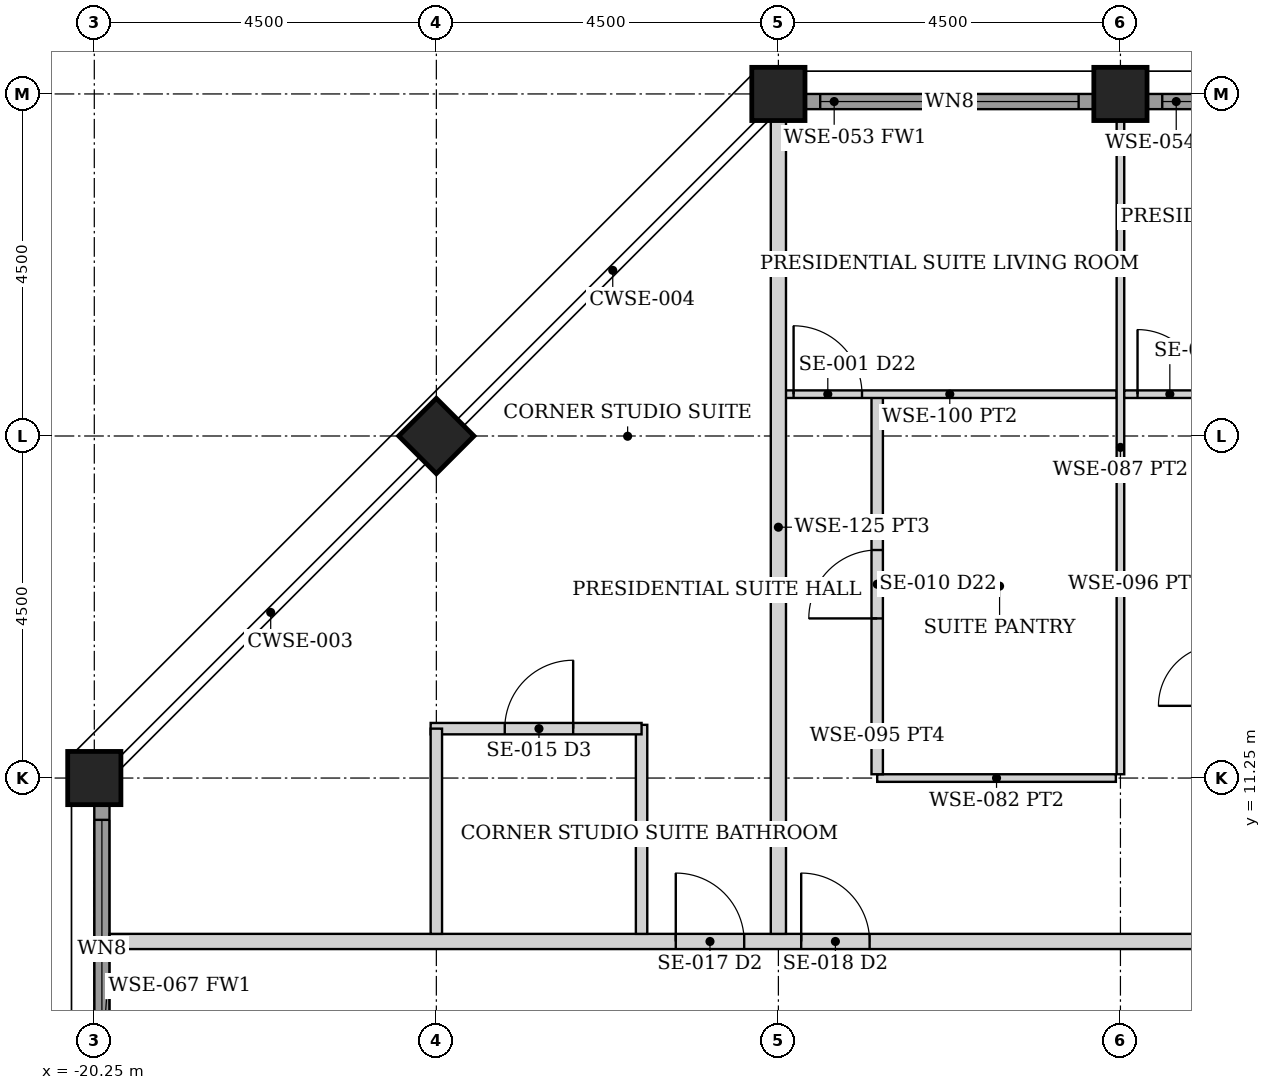
"""IFC4 building model, lengths in metres.
Left out: names, types, materials, properties, quantities, classifications, styles, units other than length and angle.
Written with IfcOpenShell. Run it as: python <this file> out.ifc"""

import sys

from ifc_helpers import new_model, si_unit, direction, frame, frame_2d, origin, origin_2d, place, context, subcontext, project, spatial, rectangle, hollow_rectangle, extrude, element, fill, save


model = new_model("IFC4")
c1 = context("Model", 3, precision=1e-05, world=origin(), true_north=direction((0.0, 1.0)))
c2 = subcontext(c1, "Body", "Model", "MODEL_VIEW")
j1 = project(units=[si_unit("LENGTHUNIT", "METRE"), si_unit("PLANEANGLEUNIT", "RADIAN")], contexts=[c1])
p1 = place(None, origin())
s1 = spatial("IfcSite", under=j1, at=p1, CompositionType="ELEMENT")
p2 = place(p1, origin())
s2 = spatial("IfcBuilding", under=s1, at=p2, CompositionType="ELEMENT")
p3 = place(p2, frame((0.0, 0.0, 253.3)))
s3 = spatial("IfcBuildingStorey", under=s2, at=p3, CompositionType="ELEMENT", Elevation=253.3)
for number, where, z_axis, x_axis in (
    (1, (-11.25, 20.25, 0.0), (0.0, 0.0, 1.0), (0.0, 1.0, 0.0)),
    (2, (-6.75, 20.25, 0.0), (0.0, 0.0, 1.0), (0.0, 1.0, 0.0)),
    (3, (-20.25, 11.25, 0.0), (0.0, 0.0, 1.0), (1.0, 0.0, 0.0)),
    (4, (-15.75, 15.75, 0.0), (0.0, 0.0, 1.0), (0.707, -0.707, 0.0)),
):
    element("IfcColumn", number, at=place(p3, frame(where, z_axis=z_axis, x_axis=x_axis)), inside=s3, PredefinedType="COLUMN", context=c2, shape_type="SweptSolid", body=[
        extrude(hollow_rectangle(XDim=0.7, YDim=0.7, WallThickness=0.035, at=origin_2d()), origin(), (0.0, 0.0, 1.0), 3.75),
    ])
p4 = place(p3, frame((-10.895, 20.15, 0.0), z_axis=(0.0, 0.0, 1.0), x_axis=(1.0, 0.0, 0.0)))
e5 = element("IfcWall", 5, at=p4, inside=s3, PredefinedType="SOLIDWALL", context=c2, shape_type="SweptSolid", body=[
    extrude(rectangle(XDim=3.79, YDim=0.2, at=frame_2d((1.895, 0.0))), origin(), (0.0, 0.0, 1.0), 2.579),
])
p5 = place(p4, frame((0.195, 0.0, 0.3)))
e6 = element("IfcOpeningElement", 6, at=p5, cuts=e5, PredefinedType="OPENING", context=c2, shape_type="SweptSolid", body=[
    extrude(rectangle(XDim=3.4, YDim=2.129, at=frame_2d((1.7, 1.064))), frame((0.0, 0.11, 0.0), z_axis=(0.0, -1.0, 0.0), x_axis=(1.0, 0.0, 0.0)), (0.0, 0.0, 1.0), 0.22),
])
p6 = place(p3, frame((-6.395, 20.15, 0.0), z_axis=(0.0, 0.0, 1.0), x_axis=(1.0, 0.0, 0.0)))
e7 = element("IfcWall", 7, at=p6, inside=s3, PredefinedType="SOLIDWALL", context=c2, shape_type="SweptSolid", body=[
    extrude(rectangle(XDim=3.79, YDim=0.2, at=frame_2d((1.895, 0.0))), origin(), (0.0, 0.0, 1.0), 2.579),
])
p7 = place(p6, frame((0.195, 0.0, 0.3)))
e8 = element("IfcOpeningElement", 8, at=p7, cuts=e7, PredefinedType="OPENING", context=c2, shape_type="SweptSolid", body=[
    extrude(rectangle(XDim=3.4, YDim=2.129, at=frame_2d((1.7, 1.064))), frame((0.0, 0.11, 0.0), z_axis=(0.0, -1.0, 0.0), x_axis=(1.0, 0.0, 0.0)), (0.0, 0.0, 1.0), 0.22),
])
p8 = place(p3, frame((-20.15, 7.105, 0.0), z_axis=(0.0, 0.0, 1.0), x_axis=(0.0, 1.0, 0.0)))
e9 = element("IfcWall", 9, at=p8, inside=s3, PredefinedType="SOLIDWALL", context=c2, shape_type="SweptSolid", body=[
    extrude(rectangle(XDim=3.79, YDim=0.2, at=frame_2d((1.895, 0.0))), origin(), (0.0, 0.0, 1.0), 2.579),
])
p9 = place(p8, frame((0.195, 0.0, 0.3)))
e10 = element("IfcOpeningElement", 10, at=p9, cuts=e9, PredefinedType="OPENING", context=c2, shape_type="SweptSolid", body=[
    extrude(rectangle(XDim=3.4, YDim=2.129, at=frame_2d((1.7, 1.064))), frame((0.0, 0.11, 0.0), z_axis=(0.0, -1.0, 0.0), x_axis=(1.0, 0.0, 0.0)), (0.0, 0.0, 1.0), 0.22),
])
p10 = place(p3, frame((-20.05, 9.1, 0.0), z_axis=(0.0, 0.0, 1.0), x_axis=(1.0, 0.0, 0.0)))
e11 = element("IfcWall", 11, at=p10, inside=s3, PredefinedType="PARTITIONING", context=c2, shape_type="SweptSolid", body=[
    extrude(rectangle(XDim=40.1, YDim=0.2, at=frame_2d((20.05, 0.0))), origin(), (0.0, 0.0, 1.0), 2.573),
])
p11 = place(p10, frame((9.1, 0.0, 0.0)))
e12 = element("IfcOpeningElement", 12, at=p11, cuts=e11, PredefinedType="OPENING", context=c2, shape_type="SweptSolid", body=[
    extrude(rectangle(XDim=0.9, YDim=2.1, at=frame_2d((0.45, 1.05))), frame((0.0, 0.11, 0.0), z_axis=(0.0, -1.0, 0.0), x_axis=(1.0, 0.0, 0.0)), (0.0, 0.0, 1.0), 0.22),
])
p12 = place(p10, frame((31.75, 0.0, 0.0)))
e13 = element("IfcOpeningElement", 13, at=p12, cuts=e11, PredefinedType="OPENING", context=c2, shape_type="SweptSolid", body=[
    extrude(rectangle(XDim=0.9, YDim=2.1, at=frame_2d((0.45, 1.05))), frame((0.0, 0.11, 0.0), z_axis=(0.0, -1.0, 0.0), x_axis=(1.0, 0.0, 0.0)), (0.0, 0.0, 1.0), 0.22),
])
p13 = place(p10, frame((7.45, 0.0, 0.0)))
e14 = element("IfcOpeningElement", 14, at=p13, cuts=e11, PredefinedType="OPENING", context=c2, shape_type="SweptSolid", body=[
    extrude(rectangle(XDim=0.9, YDim=2.1, at=frame_2d((0.45, 1.05))), frame((0.0, 0.11, 0.0), z_axis=(0.0, -1.0, 0.0), x_axis=(1.0, 0.0, 0.0)), (0.0, 0.0, 1.0), 0.22),
])
p14 = place(p3, frame((-9.95, 11.25, 0.0), z_axis=(0.0, 0.0, 1.0), x_axis=(1.0, 0.0, 0.0)))
e15 = element("IfcWall", 15, at=p14, inside=s3, PredefinedType="PARTITIONING", context=c2, shape_type="SweptSolid", body=[
    extrude(rectangle(XDim=3.14, YDim=0.1, at=frame_2d((1.57, 0.0))), origin(), (0.0, 0.0, 1.0), 2.573),
])
p15 = place(p3, frame((-9.95, 11.3, 0.0), z_axis=(0.0, 0.0, 1.0), x_axis=(0.0, 1.0, 0.0)))
e16 = element("IfcWall", 16, at=p15, inside=s3, PredefinedType="PARTITIONING", context=c2, shape_type="SweptSolid", body=[
    extrude(rectangle(XDim=5.0, YDim=0.15, at=frame_2d((2.5, 0.0))), origin(), (0.0, 0.0, 1.0), 2.573),
])
p16 = place(p15, frame((2.05, 0.0, 0.0)))
e17 = element("IfcOpeningElement", 17, at=p16, cuts=e16, PredefinedType="OPENING", context=c2, shape_type="SweptSolid", body=[
    extrude(rectangle(XDim=0.9, YDim=2.1, at=frame_2d((0.45, 1.05))), frame((0.0, 0.085, 0.0), z_axis=(0.0, -1.0, 0.0), x_axis=(1.0, 0.0, 0.0)), (0.0, 0.0, 1.0), 0.17),
])
p17 = place(p3, frame((-11.19, 16.3, 0.0), z_axis=(0.0, 0.0, 1.0), x_axis=(1.0, 0.0, 0.0)))
e18 = element("IfcWall", 18, at=p17, inside=s3, PredefinedType="PARTITIONING", context=c2, shape_type="SweptSolid", body=[
    extrude(rectangle(XDim=4.39, YDim=0.1, at=frame_2d((2.195, 0.0))), origin(), (0.0, 0.0, 1.0), 2.573),
])
p18 = place(p17, frame((0.14, 0.0, 0.0)))
e19 = element("IfcOpeningElement", 19, at=p18, cuts=e18, PredefinedType="OPENING", context=c2, shape_type="SweptSolid", body=[
    extrude(rectangle(XDim=0.9, YDim=2.1, at=frame_2d((0.45, 1.05))), frame((0.0, 0.06, 0.0), z_axis=(0.0, -1.0, 0.0), x_axis=(1.0, 0.0, 0.0)), (0.0, 0.0, 1.0), 0.12),
])
p19 = place(p3, frame((-6.75, 11.3, 0.0), z_axis=(0.0, 0.0, 1.0), x_axis=(0.0, 1.0, 0.0)))
e20 = element("IfcWall", 20, at=p19, inside=s3, PredefinedType="PARTITIONING", context=c2, shape_type="SweptSolid", body=[
    extrude(rectangle(XDim=8.6, YDim=0.1, at=frame_2d((4.3, 0.0))), origin(), (0.0, 0.0, 1.0), 2.573),
])
p20 = place(p3, frame((-6.7, 16.3, 0.0), z_axis=(0.0, 0.0, 1.0), x_axis=(1.0, 0.0, 0.0)))
e21 = element("IfcWall", 21, at=p20, inside=s3, PredefinedType="PARTITIONING", context=c2, shape_type="SweptSolid", body=[
    extrude(rectangle(XDim=4.4, YDim=0.1, at=frame_2d((2.2, 0.0))), origin(), (0.0, 0.0, 1.0), 2.573),
])
p21 = place(p20, frame((0.175, 0.0, 0.0)))
e22 = element("IfcOpeningElement", 22, at=p21, cuts=e21, PredefinedType="OPENING", context=c2, shape_type="SweptSolid", body=[
    extrude(rectangle(XDim=0.85, YDim=2.1, at=frame_2d((0.425, 1.05))), frame((0.0, 0.06, 0.0), z_axis=(0.0, -1.0, 0.0), x_axis=(1.0, 0.0, 0.0)), (0.0, 0.0, 1.0), 0.12),
])
p22 = place(p20, frame((2.41, 0.0, 0.0)))
e23 = element("IfcOpeningElement", 23, at=p22, cuts=e21, PredefinedType="OPENING", context=c2, shape_type="SweptSolid", body=[
    extrude(rectangle(XDim=0.9, YDim=2.1, at=frame_2d((0.45, 1.05))), frame((0.0, 0.06, 0.0), z_axis=(0.0, -1.0, 0.0), x_axis=(1.0, 0.0, 0.0)), (0.0, 0.0, 1.0), 0.12),
])
p23 = place(p3, frame((-11.25, 9.2, 0.0), z_axis=(0.0, 0.0, 1.0), x_axis=(0.0, 1.0, 0.0)))
e24 = element("IfcWall", 24, at=p23, inside=s3, PredefinedType="PARTITIONING", context=c2, shape_type="SweptSolid", body=[
    extrude(rectangle(XDim=10.7, YDim=0.2, at=frame_2d((5.35, 0.0))), origin(), (0.0, 0.0, 1.0), 2.573),
])
p24 = place(p3, frame((-13.05, 9.2, 0.0), z_axis=(0.0, 0.0, 1.0), x_axis=(0.0, 1.0, 0.0)))
e25 = element("IfcWall", 25, at=p24, inside=s3, PredefinedType="PARTITIONING", context=c2, shape_type="SweptSolid", body=[
    extrude(rectangle(XDim=2.75, YDim=0.15, at=frame_2d((1.375, 0.0))), origin(), (0.0, 0.0, 1.0), 2.573),
])
p25 = place(p3, frame((-15.825, 11.9, 0.0), z_axis=(0.0, 0.0, 1.0), x_axis=(1.0, 0.0, 0.0)))
e26 = element("IfcWall", 26, at=p25, inside=s3, PredefinedType="PARTITIONING", context=c2, shape_type="SweptSolid", body=[
    extrude(rectangle(XDim=2.775, YDim=0.15, at=frame_2d((1.387, 0.0))), origin(), (0.0, 0.0, 1.0), 2.573),
])
p26 = place(p25, frame((0.975, 0.0, 0.0)))
e27 = element("IfcOpeningElement", 27, at=p26, cuts=e26, PredefinedType="OPENING", context=c2, shape_type="SweptSolid", body=[
    extrude(rectangle(XDim=0.9, YDim=2.1, at=frame_2d((0.45, 1.05))), frame((0.0, 0.085, 0.0), z_axis=(0.0, -1.0, 0.0), x_axis=(1.0, 0.0, 0.0)), (0.0, 0.0, 1.0), 0.17),
])
p27 = place(p3, frame((-15.75, 9.2, 0.0), z_axis=(0.0, 0.0, 1.0), x_axis=(0.0, 1.0, 0.0)))
e28 = element("IfcWall", 28, at=p27, inside=s3, PredefinedType="PARTITIONING", context=c2, shape_type="SweptSolid", body=[
    extrude(rectangle(XDim=2.7, YDim=0.15, at=frame_2d((1.35, 0.0))), origin(), (0.0, 0.0, 1.0), 2.573),
])
p28 = place(p5, origin())
e29 = element("IfcWindow", 29, at=p28, inside=s3, PartitioningType="SINGLE_PANEL", PredefinedType="WINDOW", context=c2, shape_type="SweptSolid", body=[
    extrude(rectangle(XDim=3.4, YDim=2.129, at=frame_2d((1.7, 1.064))), frame((0.0, 0.03, 0.0), z_axis=(0.0, -1.0, 0.0), x_axis=(1.0, 0.0, 0.0)), (0.0, 0.0, 1.0), 0.06),
])
fill(e6, e29)
p29 = place(p7, origin())
e30 = element("IfcWindow", 30, at=p29, inside=s3, PartitioningType="SINGLE_PANEL", PredefinedType="WINDOW", context=c2, shape_type="SweptSolid", body=[
    extrude(rectangle(XDim=3.4, YDim=2.129, at=frame_2d((1.7, 1.064))), frame((0.0, 0.03, 0.0), z_axis=(0.0, -1.0, 0.0), x_axis=(1.0, 0.0, 0.0)), (0.0, 0.0, 1.0), 0.06),
])
fill(e8, e30)
p30 = place(p9, origin())
e31 = element("IfcWindow", 31, at=p30, inside=s3, PartitioningType="SINGLE_PANEL", PredefinedType="WINDOW", context=c2, shape_type="SweptSolid", body=[
    extrude(rectangle(XDim=3.4, YDim=2.129, at=frame_2d((1.7, 1.064))), frame((0.0, 0.03, 0.0), z_axis=(0.0, -1.0, 0.0), x_axis=(1.0, 0.0, 0.0)), (0.0, 0.0, 1.0), 0.06),
])
fill(e10, e31)
p31 = place(p11, origin())
e32 = element("IfcDoor", 32, at=p31, inside=s3, OperationType="SINGLE_SWING_LEFT", PredefinedType="DOOR", context=c2, shape_type="SweptSolid", body=[
    extrude(rectangle(XDim=0.9, YDim=2.1, at=frame_2d((0.45, 1.05))), frame((0.0, 0.025, 0.0), z_axis=(0.0, -1.0, 0.0), x_axis=(1.0, 0.0, 0.0)), (0.0, 0.0, 1.0), 0.05),
])
fill(e12, e32)
p32 = place(p16, origin())
e33 = element("IfcDoor", 33, at=p32, inside=s3, OperationType="SINGLE_SWING_LEFT", PredefinedType="DOOR", context=c2, shape_type="SweptSolid", body=[
    extrude(rectangle(XDim=0.9, YDim=2.1, at=frame_2d((0.45, 1.05))), frame((0.0, 0.025, 0.0), z_axis=(0.0, -1.0, 0.0), x_axis=(1.0, 0.0, 0.0)), (0.0, 0.0, 1.0), 0.05),
])
fill(e17, e33)
p33 = place(p18, origin())
e34 = element("IfcDoor", 34, at=p33, inside=s3, OperationType="SINGLE_SWING_LEFT", PredefinedType="DOOR", context=c2, shape_type="SweptSolid", body=[
    extrude(rectangle(XDim=0.9, YDim=2.1, at=frame_2d((0.45, 1.05))), frame((0.0, 0.025, 0.0), z_axis=(0.0, -1.0, 0.0), x_axis=(1.0, 0.0, 0.0)), (0.0, 0.0, 1.0), 0.05),
])
fill(e19, e34)
p34 = place(p21, origin())
e35 = element("IfcDoor", 35, at=p34, inside=s3, OperationType="SINGLE_SWING_LEFT", PredefinedType="DOOR", context=c2, shape_type="SweptSolid", body=[
    extrude(rectangle(XDim=0.85, YDim=2.1, at=frame_2d((0.425, 1.05))), frame((0.0, 0.025, 0.0), z_axis=(0.0, -1.0, 0.0), x_axis=(1.0, 0.0, 0.0)), (0.0, 0.0, 1.0), 0.05),
])
fill(e22, e35)
p35 = place(p13, origin())
e36 = element("IfcDoor", 36, at=p35, inside=s3, OperationType="SINGLE_SWING_LEFT", PredefinedType="DOOR", context=c2, shape_type="SweptSolid", body=[
    extrude(rectangle(XDim=0.9, YDim=2.1, at=frame_2d((0.45, 1.05))), frame((0.0, 0.025, 0.0), z_axis=(0.0, -1.0, 0.0), x_axis=(1.0, 0.0, 0.0)), (0.0, 0.0, 1.0), 0.05),
])
fill(e14, e36)
p36 = place(p26, origin())
e37 = element("IfcDoor", 37, at=p36, inside=s3, OperationType="SINGLE_SWING_RIGHT", PredefinedType="DOOR", context=c2, shape_type="SweptSolid", body=[
    extrude(rectangle(XDim=0.9, YDim=2.1, at=frame_2d((0.45, 1.05))), frame((0.0, 0.025, 0.0), z_axis=(0.0, -1.0, 0.0), x_axis=(1.0, 0.0, 0.0)), (0.0, 0.0, 1.0), 0.05),
])
fill(e27, e37)
save(model, sys.argv[1])
